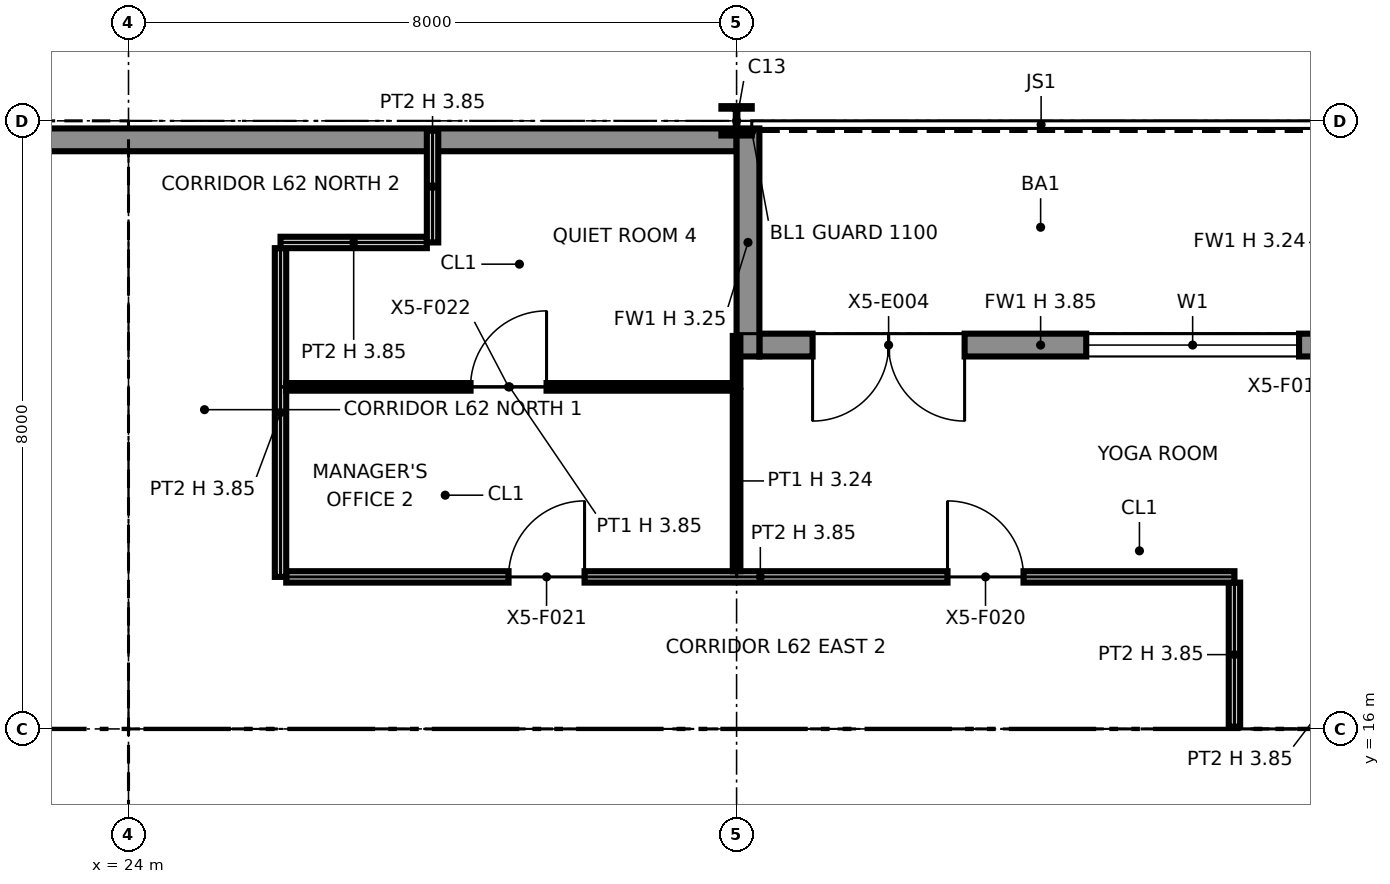
"""IFC4 building model, lengths in metres.
Left out: names, types, materials, properties, quantities, classifications, styles, units other than length and angle.
Written with IfcOpenShell. Run it as: python <this file> out.ifc"""

import sys

from ifc_helpers import new_model, si_unit, direction, frame, frame_2d, origin, origin_2d, place, context, subcontext, project, spatial, polyline, rectangle, i_section, outline, extrude, element, fill, save


model = new_model("IFC4")
c1 = context("Model", 3, precision=1e-05, world=origin(), true_north=direction((0.0, 1.0)))
c2 = subcontext(c1, "Body", "Model", "MODEL_VIEW")
j1 = project(units=[si_unit("LENGTHUNIT", "METRE"), si_unit("PLANEANGLEUNIT", "RADIAN")], contexts=[c1])
p1 = place(None, origin())
s1 = spatial("IfcSite", under=j1, at=p1, CompositionType="ELEMENT")
p2 = place(p1, origin())
s2 = spatial("IfcBuilding", under=s1, at=p2, CompositionType="ELEMENT")
p3 = place(p2, frame((0.0, 0.0, 283.0)))
s3 = spatial("IfcBuildingStorey", under=s2, at=p3, CompositionType="ELEMENT", Elevation=283.0)
p4 = place(p3, frame((24.0, 16.0, 0.0), z_axis=(0.0, 0.0, 1.0), x_axis=(1.0, 0.0, 0.0)))
e1 = element("IfcColumn", 1, at=p4, inside=s3, PredefinedType="COLUMN", context=c2, shape_type="SweptSolid", body=[
    extrude(i_section(OverallWidth=0.371, OverallDepth=0.361, WebThickness=0.012, FlangeThickness=0.02, at=origin_2d()), origin(), (0.0, 0.0, 1.0), 3.85),
])
p5 = place(p3, frame((24.0, 24.0, 0.0), z_axis=(0.0, 0.0, 1.0), x_axis=(1.0, 0.0, 0.0)))
e2 = element("IfcColumn", 2, at=p5, inside=s3, PredefinedType="COLUMN", context=c2, shape_type="SweptSolid", body=[
    extrude(i_section(OverallWidth=0.399, OverallDepth=0.386, WebThickness=0.021, FlangeThickness=0.033, at=origin_2d()), origin(), (0.0, 0.0, 1.0), 3.85),
])
p6 = place(p3, frame((32.0, 16.0, 0.0), z_axis=(0.0, 0.0, 1.0), x_axis=(1.0, 0.0, 0.0)))
e3 = element("IfcColumn", 3, at=p6, inside=s3, PredefinedType="COLUMN", context=c2, shape_type="SweptSolid", body=[
    extrude(i_section(OverallWidth=0.257, OverallDepth=0.363, WebThickness=0.013, FlangeThickness=0.022, at=origin_2d()), origin(), (0.0, 0.0, 1.0), 3.85),
])
p7 = place(p3, frame((32.0, 24.0, 0.0), z_axis=(0.0, 0.0, 1.0), x_axis=(1.0, 0.0, 0.0)))
e4 = element("IfcColumn", 4, at=p7, inside=s3, PredefinedType="COLUMN", context=c2, shape_type="SweptSolid", body=[
    extrude(i_section(OverallWidth=0.399, OverallDepth=0.386, WebThickness=0.021, FlangeThickness=0.033, at=origin_2d()), origin(), (0.0, 0.0, 1.0), 3.85),
])
p8 = place(p3, frame((39.7, 21.05, 0.0), z_axis=(0.0, 0.0, 1.0), x_axis=(-1.0, 0.0, 0.0)))
e5 = element("IfcWall", 5, at=p8, inside=s3, PredefinedType="SOLIDWALL", context=c2, shape_type="SweptSolid", body=[
    extrude(rectangle(XDim=7.4, YDim=0.3, at=frame_2d((3.7, 0.0))), origin(), (0.0, 0.0, 1.0), 3.85),
])
p9 = place(p8, frame((0.3, 0.0, 0.9)))
e6 = element("IfcOpeningElement", 6, at=p9, cuts=e5, PredefinedType="OPENING", context=c2, shape_type="SweptSolid", body=[
    extrude(rectangle(XDim=2.8, YDim=2.2, at=frame_2d((1.4, 1.1))), frame((0.0, 0.16, 0.0), z_axis=(0.0, -1.0, 0.0), x_axis=(1.0, 0.0, 0.0)), (0.0, 0.0, 1.0), 0.32),
])
p10 = place(p8, frame((4.7, 0.0, 0.0)))
e7 = element("IfcOpeningElement", 7, at=p10, cuts=e5, PredefinedType="OPENING", context=c2, shape_type="SweptSolid", body=[
    extrude(rectangle(XDim=2.0, YDim=2.4, at=frame_2d((1.0, 1.2))), frame((0.0, 0.16, 0.0), z_axis=(0.0, -1.0, 0.0), x_axis=(1.0, 0.0, 0.0)), (0.0, 0.0, 1.0), 0.32),
])
p11 = place(p3, frame((32.15, 23.9, 0.0), z_axis=(0.0, 0.0, 1.0), x_axis=(0.0, -1.0, 0.0)))
e8 = element("IfcWall", 8, at=p11, inside=s3, PredefinedType="SOLIDWALL", context=c2, shape_type="SweptSolid", body=[
    extrude(rectangle(XDim=3.0, YDim=0.3, at=frame_2d((1.5, 0.0))), origin(), (0.0, 0.0, 1.0), 3.247),
])
p12 = place(p3, frame((32.0, 23.75, 0.0), z_axis=(0.0, 0.0, 1.0), x_axis=(-1.0, 0.0, 0.0)))
e9 = element("IfcWall", 9, at=p12, inside=s3, PredefinedType="SOLIDWALL", context=c2, shape_type="SweptSolid", body=[
    extrude(rectangle(XDim=25.9, YDim=0.3, at=frame_2d((12.95, 0.0))), origin(), (0.0, 0.0, 1.0), 3.85),
])
p13 = place(p3, frame((8.65, 23.25, 0.0), z_axis=(0.0, 0.0, 1.0), x_axis=(1.0, 0.0, 0.0)))
e10 = element("IfcWall", 10, at=p13, inside=s3, PredefinedType="PARTITIONING", context=c2, shape_type="SweptSolid", body=[
    extrude(outline(polyline([(0.0, 0.0), (14.7, 0.0), (14.7, 3.85), (7.438, 3.85), (7.437, 3.318), (7.263, 3.318), (7.262, 3.85), (0.0, 3.85), (0.0, 0.0)])), frame((0.0, 0.1, 0.0), z_axis=(0.0, -1.0, 0.0), x_axis=(1.0, 0.0, 0.0)), (0.0, 0.0, 1.0), 0.2),
])
p14 = place(p3, frame((8.85, 19.9, 0.0), z_axis=(0.0, 0.0, 1.0), x_axis=(1.0, 0.0, 0.0)))
e11 = element("IfcWall", 11, at=p14, inside=s3, PredefinedType="PARTITIONING", context=c2, shape_type="SweptSolid", body=[
    extrude(outline(polyline([(0.0, 0.0), (14.3, 0.0), (14.3, 3.85), (7.238, 3.85), (7.237, 3.318), (7.063, 3.318), (7.062, 3.85), (0.0, 3.85), (0.0, 0.0)])), frame((0.0, 0.1, 0.0), z_axis=(0.0, -1.0, 0.0), x_axis=(1.0, 0.0, 0.0)), (0.0, 0.0, 1.0), 0.2),
])
p15 = place(p14, frame((2.125, 0.0, 0.0)))
e12 = element("IfcOpeningElement", 12, at=p15, cuts=e11, PredefinedType="OPENING", context=c2, shape_type="SweptSolid", body=[
    extrude(rectangle(XDim=0.9, YDim=2.1, at=frame_2d((0.45, 1.05))), frame((0.0, 0.11, 0.0), z_axis=(0.0, -1.0, 0.0), x_axis=(1.0, 0.0, 0.0)), (0.0, 0.0, 1.0), 0.22),
])
p16 = place(p14, frame((5.65, 0.0, 0.0)))
e13 = element("IfcOpeningElement", 13, at=p16, cuts=e11, PredefinedType="OPENING", context=c2, shape_type="SweptSolid", body=[
    extrude(rectangle(XDim=1.1, YDim=2.1, at=frame_2d((0.55, 1.05))), frame((0.0, 0.11, 0.0), z_axis=(0.0, -1.0, 0.0), x_axis=(1.0, 0.0, 0.0)), (0.0, 0.0, 1.0), 0.22),
])
p17 = place(p14, frame((7.95, 0.0, 0.0)))
e14 = element("IfcOpeningElement", 14, at=p17, cuts=e11, PredefinedType="OPENING", context=c2, shape_type="SweptSolid", body=[
    extrude(rectangle(XDim=1.1, YDim=2.1, at=frame_2d((0.55, 1.05))), frame((0.0, 0.11, 0.0), z_axis=(0.0, -1.0, 0.0), x_axis=(1.0, 0.0, 0.0)), (0.0, 0.0, 1.0), 0.22),
])
p18 = place(p14, frame((10.25, 0.0, 0.0)))
e15 = element("IfcOpeningElement", 15, at=p18, cuts=e11, PredefinedType="OPENING", context=c2, shape_type="SweptSolid", body=[
    extrude(rectangle(XDim=1.1, YDim=2.1, at=frame_2d((0.55, 1.05))), frame((0.0, 0.11, 0.0), z_axis=(0.0, -1.0, 0.0), x_axis=(1.0, 0.0, 0.0)), (0.0, 0.0, 1.0), 0.22),
])
p19 = place(p14, frame((12.625, 0.0, 0.0)))
e16 = element("IfcOpeningElement", 16, at=p19, cuts=e11, PredefinedType="OPENING", context=c2, shape_type="SweptSolid", body=[
    extrude(rectangle(XDim=1.1, YDim=2.1, at=frame_2d((0.55, 1.05))), frame((0.0, 0.11, 0.0), z_axis=(0.0, -1.0, 0.0), x_axis=(1.0, 0.0, 0.0)), (0.0, 0.0, 1.0), 0.22),
])
p20 = place(p3, frame((16.191, 16.0, 0.0), z_axis=(0.0, 0.0, 1.0), x_axis=(1.0, 0.0, 0.0)))
e17 = element("IfcWall", 17, at=p20, inside=s3, PredefinedType="PARTITIONING", context=c2, shape_type="SweptSolid", body=[
    extrude(rectangle(XDim=6.958, YDim=0.6, at=frame_2d((3.479, 0.0))), origin(), (0.0, 0.0, 1.0), 3.318),
])
p21 = place(p20, frame((1.259, 0.0, 0.0)))
e18 = element("IfcOpeningElement", 18, at=p21, cuts=e17, PredefinedType="OPENING", context=c2, shape_type="SweptSolid", body=[
    extrude(rectangle(XDim=0.8, YDim=2.1, at=frame_2d((0.4, 1.05))), frame((0.0, 0.31, 0.0), z_axis=(0.0, -1.0, 0.0), x_axis=(1.0, 0.0, 0.0)), (0.0, 0.0, 1.0), 0.62),
])
p22 = place(p20, frame((4.734, 0.0, 0.0), z_axis=(0.0, 0.0, 1.0), x_axis=(-1.0, 0.0, 0.0)))
e19 = element("IfcOpeningElement", 19, at=p22, cuts=e17, PredefinedType="OPENING", context=c2, shape_type="SweptSolid", body=[
    extrude(rectangle(XDim=0.8, YDim=2.1, at=frame_2d((0.4, 1.05))), frame((0.0, 0.31, 0.0), z_axis=(0.0, -1.0, 0.0), x_axis=(1.0, 0.0, 0.0)), (0.0, 0.0, 1.0), 0.62),
])
p23 = place(p20, frame((6.658, 0.0, 0.0), z_axis=(0.0, 0.0, 1.0), x_axis=(-1.0, 0.0, 0.0)))
e20 = element("IfcOpeningElement", 20, at=p23, cuts=e17, PredefinedType="OPENING", context=c2, shape_type="SweptSolid", body=[
    extrude(rectangle(XDim=0.7, YDim=2.1, at=frame_2d((0.35, 1.05))), frame((0.0, 0.31, 0.0), z_axis=(0.0, -1.0, 0.0), x_axis=(1.0, 0.0, 0.0)), (0.0, 0.0, 1.0), 0.62),
])
p24 = place(p3, frame((23.25, 8.85, 0.0), z_axis=(0.0, 0.0, 1.0), x_axis=(0.0, 1.0, 0.0)))
e21 = element("IfcWall", 21, at=p24, inside=s3, PredefinedType="PARTITIONING", context=c2, shape_type="SweptSolid", body=[
    extrude(outline(polyline([(0.0, 0.0), (14.3, 0.0), (14.3, 3.85), (10.225, 3.85), (10.224, 3.44), (10.076, 3.44), (10.075, 3.85), (7.238, 3.85), (7.237, 3.318), (7.063, 3.318), (7.062, 3.85), (5.225, 3.85), (5.224, 3.44), (5.076, 3.44), (5.075, 3.85), (0.0, 3.85), (0.0, 0.0)])), frame((0.0, 0.1, 0.0), z_axis=(0.0, -1.0, 0.0), x_axis=(1.0, 0.0, 0.0)), (0.0, 0.0, 1.0), 0.2),
])
p25 = place(p24, frame((8.3, 0.0, 0.0)))
e22 = element("IfcOpeningElement", 22, at=p25, cuts=e21, PredefinedType="OPENING", context=c2, shape_type="SweptSolid", body=[
    extrude(rectangle(XDim=1.8, YDim=2.1, at=frame_2d((0.9, 1.05))), frame((0.0, 0.11, 0.0), z_axis=(0.0, -1.0, 0.0), x_axis=(1.0, 0.0, 0.0)), (0.0, 0.0, 1.0), 0.22),
])
p26 = place(p3, frame((24.75, 8.85, 0.0), z_axis=(0.0, 0.0, 1.0), x_axis=(0.0, 1.0, 0.0)))
e23 = element("IfcWall", 23, at=p26, inside=s3, PredefinedType="PARTITIONING", context=c2, shape_type="SweptSolid", body=[
    extrude(outline(polyline([(0.0, 0.0), (6.3, 0.0), (6.3, 3.85), (3.225, 3.85), (3.224, 3.44), (3.076, 3.44), (3.075, 3.85), (0.0, 3.85), (0.0, 0.0)])), frame((0.0, 0.1, 0.0), z_axis=(0.0, -1.0, 0.0), x_axis=(1.0, 0.0, 0.0)), (0.0, 0.0, 1.0), 0.2),
])
p27 = place(p3, frame((24.65, 15.25, 0.0), z_axis=(0.0, 0.0, 1.0), x_axis=(1.0, 0.0, 0.0)))
e24 = element("IfcWall", 24, at=p27, inside=s3, PredefinedType="PARTITIONING", context=c2, shape_type="SweptSolid", body=[
    extrude(outline(polyline([(0.0, 0.0), (14.7, 0.0), (14.7, 3.85), (7.438, 3.85), (7.437, 3.318), (7.263, 3.318), (7.262, 3.85), (0.0, 3.85), (0.0, 0.0)])), frame((0.0, 0.1, 0.0), z_axis=(0.0, -1.0, 0.0), x_axis=(1.0, 0.0, 0.0)), (0.0, 0.0, 1.0), 0.2),
])
p28 = place(p27, frame((2.85, 0.0, 0.0)))
e25 = element("IfcOpeningElement", 25, at=p28, cuts=e24, PredefinedType="OPENING", context=c2, shape_type="SweptSolid", body=[
    extrude(rectangle(XDim=1.8, YDim=2.1, at=frame_2d((0.9, 1.05))), frame((0.0, 0.11, 0.0), z_axis=(0.0, -1.0, 0.0), x_axis=(1.0, 0.0, 0.0)), (0.0, 0.0, 1.0), 0.22),
])
p29 = place(p27, frame((9.95, 0.0, 0.0), z_axis=(0.0, 0.0, 1.0), x_axis=(-1.0, 0.0, 0.0)))
e26 = element("IfcOpeningElement", 26, at=p29, cuts=e24, PredefinedType="OPENING", context=c2, shape_type="SweptSolid", body=[
    extrude(rectangle(XDim=1.4, YDim=2.1, at=frame_2d((0.7, 1.05))), frame((0.0, 0.11, 0.0), z_axis=(0.0, -1.0, 0.0), x_axis=(1.0, 0.0, 0.0)), (0.0, 0.0, 1.0), 0.22),
])
p30 = place(p27, frame((13.4, 0.0, 0.0), z_axis=(0.0, 0.0, 1.0), x_axis=(-1.0, 0.0, 0.0)))
e27 = element("IfcOpeningElement", 27, at=p30, cuts=e24, PredefinedType="OPENING", context=c2, shape_type="SweptSolid", body=[
    extrude(rectangle(XDim=1.4, YDim=2.1, at=frame_2d((0.7, 1.05))), frame((0.0, 0.11, 0.0), z_axis=(0.0, -1.0, 0.0), x_axis=(1.0, 0.0, 0.0)), (0.0, 0.0, 1.0), 0.22),
])
p31 = place(p3, frame((27.325, 13.55, 0.0), z_axis=(0.0, 0.0, 1.0), x_axis=(0.0, 1.0, 0.0)))
e28 = element("IfcWall", 28, at=p31, inside=s3, PredefinedType="PARTITIONING", context=c2, shape_type="SweptSolid", body=[
    extrude(rectangle(XDim=1.6, YDim=0.15, at=frame_2d((0.8, 0.0))), origin(), (0.0, 0.0, 1.0), 3.85),
])
p32 = place(p31, frame((0.3, 0.0, 0.0)))
e29 = element("IfcOpeningElement", 29, at=p32, cuts=e28, PredefinedType="OPENING", context=c2, shape_type="SweptSolid", body=[
    extrude(rectangle(XDim=0.9, YDim=2.1, at=frame_2d((0.45, 1.05))), frame((0.0, 0.085, 0.0), z_axis=(0.0, -1.0, 0.0), x_axis=(1.0, 0.0, 0.0)), (0.0, 0.0, 1.0), 0.17),
])
p33 = place(p3, frame((32.0, 11.6, 0.0), z_axis=(0.0, 0.0, 1.0), x_axis=(0.0, 1.0, 0.0)))
e30 = element("IfcWall", 30, at=p33, inside=s3, PredefinedType="PARTITIONING", context=c2, shape_type="SweptSolid", body=[
    extrude(rectangle(XDim=3.55, YDim=0.6, at=frame_2d((1.775, 0.0))), origin(), (0.0, 0.0, 1.0), 3.318),
])
for number, where, z_axis, x_axis in (
    (31, (35.6, 8.85, 0.0), (0.0, 0.0, 1.0), (0.0, 1.0, 0.0)),
    (32, (39.25, 8.85, 0.0), (0.0, 0.0, 1.0), (0.0, 1.0, 0.0)),
):
    element("IfcWall", number, at=place(p3, frame(where, z_axis=z_axis, x_axis=x_axis)), inside=s3, PredefinedType="PARTITIONING", context=c2, shape_type="SweptSolid", body=[
        extrude(rectangle(XDim=6.3, YDim=0.2, at=frame_2d((3.15, 0.0))), origin(), (0.0, 0.0, 1.0), 3.85),
    ])
p34 = place(p3, frame((38.55, 16.03, 0.0), z_axis=(0.0, 0.0, 1.0), x_axis=(0.0, 1.0, 0.0)))
e33 = element("IfcWall", 33, at=p34, inside=s3, PredefinedType="PARTITIONING", context=c2, shape_type="SweptSolid", body=[
    extrude(rectangle(XDim=1.895, YDim=0.15, at=frame_2d((0.948, 0.0))), origin(), (0.0, 0.0, 1.0), 3.85),
])
p35 = place(p3, frame((26.075, 18.0, 0.0), z_axis=(0.0, 0.0, 1.0), x_axis=(1.0, 0.0, 0.0)))
e34 = element("IfcWall", 34, at=p35, inside=s3, PredefinedType="PARTITIONING", context=c2, shape_type="SweptSolid", body=[
    extrude(rectangle(XDim=12.475, YDim=0.15, at=frame_2d((6.238, 0.0))), origin(), (0.0, 0.0, 1.0), 3.85),
])
p36 = place(p35, frame((8.7, 0.0, 0.0)))
e35 = element("IfcOpeningElement", 35, at=p36, cuts=e34, PredefinedType="OPENING", context=c2, shape_type="SweptSolid", body=[
    extrude(rectangle(XDim=1.0, YDim=2.1, at=frame_2d((0.5, 1.05))), frame((0.0, 0.085, 0.0), z_axis=(0.0, -1.0, 0.0), x_axis=(1.0, 0.0, 0.0)), (0.0, 0.0, 1.0), 0.17),
])
p37 = place(p35, frame((2.925, 0.0, 0.0)))
e36 = element("IfcOpeningElement", 36, at=p37, cuts=e34, PredefinedType="OPENING", context=c2, shape_type="SweptSolid", body=[
    extrude(rectangle(XDim=1.0, YDim=2.1, at=frame_2d((0.5, 1.05))), frame((0.0, 0.085, 0.0), z_axis=(0.0, -1.0, 0.0), x_axis=(1.0, 0.0, 0.0)), (0.0, 0.0, 1.0), 0.17),
])
p38 = place(p3, frame((26.0, 18.0, 0.0), z_axis=(0.0, 0.0, 1.0), x_axis=(0.0, 1.0, 0.0)))
e37 = element("IfcWall", 37, at=p38, inside=s3, PredefinedType="PARTITIONING", context=c2, shape_type="SweptSolid", body=[
    extrude(outline(polyline([(0.0, 0.0), (4.325, 0.0), (4.325, 3.85), (2.3, 3.85), (2.298, 3.238), (1.702, 3.238), (1.7, 3.85), (0.0, 3.85), (0.0, 0.0)])), frame((0.0, 0.075, 0.0), z_axis=(0.0, -1.0, 0.0), x_axis=(1.0, 0.0, 0.0)), (0.0, 0.0, 1.0), 0.15),
])
p39 = place(p3, frame((32.0, 18.075, 0.0), z_axis=(0.0, 0.0, 1.0), x_axis=(0.0, 1.0, 0.0)))
e38 = element("IfcWall", 38, at=p39, inside=s3, PredefinedType="PARTITIONING", context=c2, shape_type="SweptSolid", body=[
    extrude(rectangle(XDim=2.375, YDim=0.1, at=frame_2d((1.188, 0.0))), origin(), (0.0, 0.0, 1.0), 3.238),
])
p40 = place(p3, frame((26.075, 20.5, 0.0), z_axis=(0.0, 0.0, 1.0), x_axis=(1.0, 0.0, 0.0)))
e39 = element("IfcWall", 39, at=p40, inside=s3, PredefinedType="PARTITIONING", context=c2, shape_type="SweptSolid", body=[
    extrude(rectangle(XDim=5.875, YDim=0.1, at=frame_2d((2.938, 0.0))), origin(), (0.0, 0.0, 1.0), 3.85),
])
p41 = place(p40, frame((2.425, 0.0, 0.0)))
e40 = element("IfcOpeningElement", 40, at=p41, cuts=e39, PredefinedType="OPENING", context=c2, shape_type="SweptSolid", body=[
    extrude(rectangle(XDim=1.0, YDim=2.1, at=frame_2d((0.5, 1.05))), frame((0.0, 0.06, 0.0), z_axis=(0.0, -1.0, 0.0), x_axis=(1.0, 0.0, 0.0)), (0.0, 0.0, 1.0), 0.12),
])
p42 = place(p3, frame((32.0, 20.5, 0.0), z_axis=(0.0, 0.0, 1.0), x_axis=(0.0, 1.0, 0.0)))
e41 = element("IfcWall", 41, at=p42, inside=s3, PredefinedType="PARTITIONING", context=c2, shape_type="SweptSolid", body=[
    extrude(rectangle(XDim=0.67, YDim=0.1, at=frame_2d((0.335, 0.0))), origin(), (0.0, 0.0, 1.0), 3.238),
])
p43 = place(p3, frame((26.0, 22.4, 0.0), z_axis=(0.0, 0.0, 1.0), x_axis=(1.0, 0.0, 0.0)))
e42 = element("IfcWall", 42, at=p43, inside=s3, PredefinedType="PARTITIONING", context=c2, shape_type="SweptSolid", body=[
    extrude(rectangle(XDim=1.925, YDim=0.15, at=frame_2d((0.962, 0.0))), origin(), (0.0, 0.0, 1.0), 3.85),
])
p44 = place(p3, frame((28.0, 22.4, 0.0), z_axis=(0.0, 0.0, 1.0), x_axis=(0.0, 1.0, 0.0)))
e43 = element("IfcWall", 43, at=p44, inside=s3, PredefinedType="PARTITIONING", context=c2, shape_type="SweptSolid", body=[
    extrude(rectangle(XDim=1.47, YDim=0.15, at=frame_2d((0.735, 0.0))), origin(), (0.0, 0.0, 1.0), 3.85),
])
p45 = place(p9, origin())
e44 = element("IfcWindow", 44, at=p45, inside=s3, PartitioningType="SINGLE_PANEL", PredefinedType="WINDOW", context=c2, shape_type="SweptSolid", body=[
    extrude(rectangle(XDim=2.8, YDim=2.2, at=frame_2d((1.4, 1.1))), frame((0.0, 0.03, 0.0), z_axis=(0.0, -1.0, 0.0), x_axis=(1.0, 0.0, 0.0)), (0.0, 0.0, 1.0), 0.06),
])
fill(e6, e44)
p46 = place(p10, origin())
e45 = element("IfcDoor", 45, at=p46, inside=s3, OperationType="DOUBLE_DOOR_SINGLE_SWING", PredefinedType="DOOR", context=c2, shape_type="SweptSolid", body=[
    extrude(rectangle(XDim=2.0, YDim=2.4, at=frame_2d((1.0, 1.2))), frame((0.0, 0.025, 0.0), z_axis=(0.0, -1.0, 0.0), x_axis=(1.0, 0.0, 0.0)), (0.0, 0.0, 1.0), 0.05),
])
fill(e7, e45)
p47 = place(p25, origin())
e46 = element("IfcDoor", 46, at=p47, inside=s3, OperationType="DOUBLE_DOOR_SINGLE_SWING", PredefinedType="NOTDEFINED", context=c2, shape_type="SweptSolid", body=[
    extrude(rectangle(XDim=1.8, YDim=2.1, at=frame_2d((0.9, 1.05))), frame((0.0, 0.025, 0.0), z_axis=(0.0, -1.0, 0.0), x_axis=(1.0, 0.0, 0.0)), (0.0, 0.0, 1.0), 0.05),
])
fill(e22, e46)
p48 = place(p28, origin())
e47 = element("IfcDoor", 47, at=p48, inside=s3, OperationType="DOUBLE_DOOR_SINGLE_SWING", PredefinedType="NOTDEFINED", context=c2, shape_type="SweptSolid", body=[
    extrude(rectangle(XDim=1.8, YDim=2.1, at=frame_2d((0.9, 1.05))), frame((0.0, 0.025, 0.0), z_axis=(0.0, -1.0, 0.0), x_axis=(1.0, 0.0, 0.0)), (0.0, 0.0, 1.0), 0.05),
])
fill(e25, e47)
p49 = place(p29, origin())
e48 = element("IfcDoor", 48, at=p49, inside=s3, OperationType="DOUBLE_DOOR_SINGLE_SWING", PredefinedType="NOTDEFINED", context=c2, shape_type="SweptSolid", body=[
    extrude(rectangle(XDim=1.4, YDim=2.1, at=frame_2d((0.7, 1.05))), frame((0.0, 0.025, 0.0), z_axis=(0.0, -1.0, 0.0), x_axis=(1.0, 0.0, 0.0)), (0.0, 0.0, 1.0), 0.05),
])
fill(e26, e48)
p50 = place(p30, origin())
e49 = element("IfcDoor", 49, at=p50, inside=s3, OperationType="DOUBLE_DOOR_SINGLE_SWING", PredefinedType="NOTDEFINED", context=c2, shape_type="SweptSolid", body=[
    extrude(rectangle(XDim=1.4, YDim=2.1, at=frame_2d((0.7, 1.05))), frame((0.0, 0.025, 0.0), z_axis=(0.0, -1.0, 0.0), x_axis=(1.0, 0.0, 0.0)), (0.0, 0.0, 1.0), 0.05),
])
fill(e27, e49)
p51 = place(p36, origin())
e50 = element("IfcDoor", 50, at=p51, inside=s3, OperationType="SINGLE_SWING_LEFT", PredefinedType="DOOR", context=c2, shape_type="SweptSolid", body=[
    extrude(rectangle(XDim=1.0, YDim=2.1, at=frame_2d((0.5, 1.05))), frame((0.0, 0.025, 0.0), z_axis=(0.0, -1.0, 0.0), x_axis=(1.0, 0.0, 0.0)), (0.0, 0.0, 1.0), 0.05),
])
fill(e35, e50)
p52 = place(p37, origin())
e51 = element("IfcDoor", 51, at=p52, inside=s3, OperationType="SINGLE_SWING_RIGHT", PredefinedType="DOOR", context=c2, shape_type="SweptSolid", body=[
    extrude(rectangle(XDim=1.0, YDim=2.1, at=frame_2d((0.5, 1.05))), frame((0.0, 0.025, 0.0), z_axis=(0.0, -1.0, 0.0), x_axis=(1.0, 0.0, 0.0)), (0.0, 0.0, 1.0), 0.05),
])
fill(e36, e51)
p53 = place(p41, origin())
e52 = element("IfcDoor", 52, at=p53, inside=s3, OperationType="SINGLE_SWING_RIGHT", PredefinedType="DOOR", context=c2, shape_type="SweptSolid", body=[
    extrude(rectangle(XDim=1.0, YDim=2.1, at=frame_2d((0.5, 1.05))), frame((0.0, 0.025, 0.0), z_axis=(0.0, -1.0, 0.0), x_axis=(1.0, 0.0, 0.0)), (0.0, 0.0, 1.0), 0.05),
])
fill(e40, e52)
save(model, sys.argv[1])
